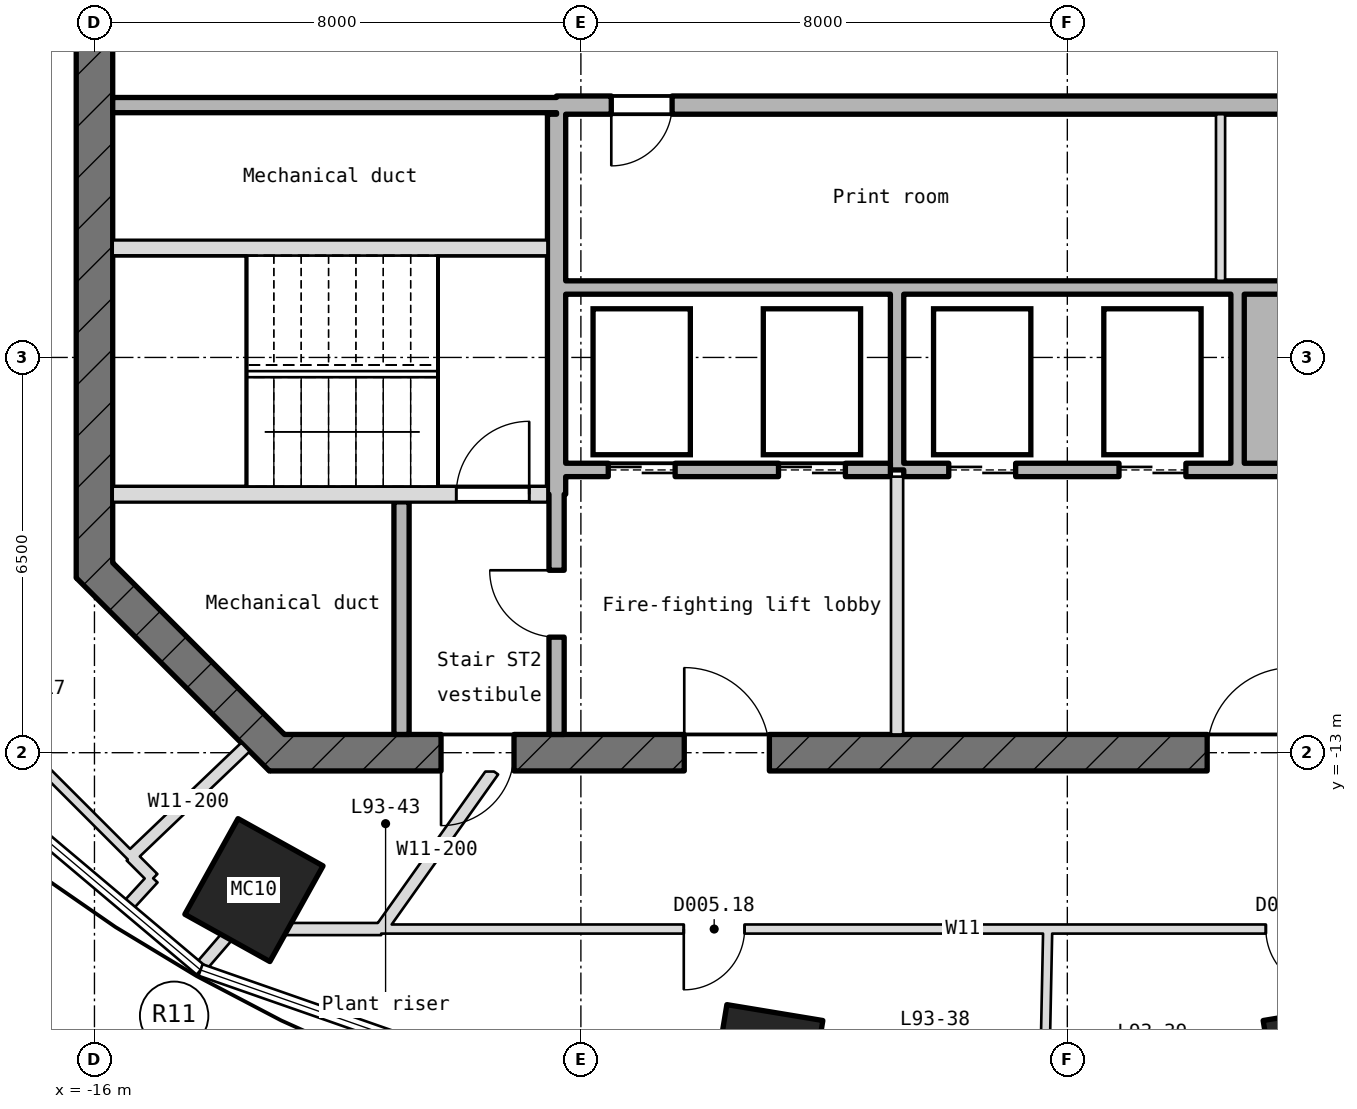
"""IFC4 building model, lengths in metres.
Left out: names, types, materials, properties, quantities, classifications, styles, units other than length and angle.
Written with IfcOpenShell. Run it as: python <this file> out.ifc"""

import sys

from ifc_helpers import new_model, si_unit, direction, frame, frame_2d, origin, origin_2d, place, context, subcontext, project, spatial, rectangle, hollow_rectangle, extrude, element, fill, save


model = new_model("IFC4")
c1 = context("Model", 3, precision=1e-05, world=origin(), true_north=direction((0.0, 1.0)))
c2 = subcontext(c1, "Body", "Model", "MODEL_VIEW")
j1 = project(units=[si_unit("LENGTHUNIT", "METRE"), si_unit("PLANEANGLEUNIT", "RADIAN")], contexts=[c1])
p1 = place(None, origin())
s1 = spatial("IfcSite", under=j1, at=p1, CompositionType="ELEMENT")
p2 = place(p1, origin())
s2 = spatial("IfcBuilding", under=s1, at=p2, CompositionType="ELEMENT")
p3 = place(p2, frame((0.0, 0.0, 413.55)))
s3 = spatial("IfcBuildingStorey", under=s2, at=p3, CompositionType="ELEMENT", Elevation=413.55)
for number, where, z_axis, x_axis in (
    (1, (-13.377, -15.26, -0.2), (0.0, 0.0, 1.0), (-0.874, 0.486, 0.0)),
    (2, (-4.957, -18.162, -0.2), (0.0, 0.0, 1.0), (-0.987, 0.163, 0.0)),
    (3, (4.157, -18.162, -0.2), (0.0, 0.0, 1.0), (-0.987, -0.163, 0.0)),
):
    element("IfcColumn", number, at=place(p3, frame(where, z_axis=z_axis, x_axis=x_axis)), inside=s3, PredefinedType="COLUMN", context=c2, shape_type="SweptSolid", body=[
        extrude(hollow_rectangle(XDim=1.6, YDim=1.8, WallThickness=0.045, at=origin_2d()), origin(), (0.0, 0.0, 1.0), 5.0),
    ])
p4 = place(p3, frame((-16.0, 10.124, -0.2), z_axis=(0.0, 0.0, 1.0), x_axis=(0.0, -1.0, 0.0)))
e4 = element("IfcWall", 4, at=p4, inside=s3, PredefinedType="SHEAR", context=c2, shape_type="SweptSolid", body=[
    extrude(rectangle(XDim=20.249, YDim=0.6, at=frame_2d((10.124, 0.0))), origin(), (0.0, 0.0, 1.0), 5.0),
])
p5 = place(p4, frame((8.924, 0.0, 0.2)))
e5 = element("IfcOpeningElement", 5, at=p5, cuts=e4, PredefinedType="OPENING", context=c2, shape_type="SweptSolid", body=[
    extrude(rectangle(XDim=2.4, YDim=2.1, at=frame_2d((1.2, 1.05))), frame((0.0, 0.31, 0.0), z_axis=(0.0, -1.0, 0.0), x_axis=(1.0, 0.0, 0.0)), (0.0, 0.0, 1.0), 0.62),
])
p6 = place(p4, frame((5.524, 0.0, 0.2)))
e6 = element("IfcOpeningElement", 6, at=p6, cuts=e4, PredefinedType="OPENING", context=c2, shape_type="SweptSolid", body=[
    extrude(rectangle(XDim=1.2, YDim=2.1, at=frame_2d((0.6, 1.05))), frame((0.0, 0.31, 0.0), z_axis=(0.0, -1.0, 0.0), x_axis=(1.0, 0.0, 0.0)), (0.0, 0.0, 1.0), 0.62),
])
p7 = place(p3, frame((-16.088, -9.912, -0.2), z_axis=(0.0, 0.0, 1.0), x_axis=(0.707106781187, -0.707106781187, 0.0)))
e7 = element("IfcWall", 7, at=p7, inside=s3, PredefinedType="SHEAR", context=c2, shape_type="SweptSolid", body=[
    extrude(rectangle(XDim=4.491, YDim=0.6, at=frame_2d((2.246, 0.0))), origin(), (0.0, 0.0, 1.0), 5.0),
])
p8 = place(p3, frame((-13.124, -13.0, -0.2), z_axis=(0.0, 0.0, 1.0), x_axis=(1.0, 0.0, 0.0)))
e8 = element("IfcWall", 8, at=p8, inside=s3, PredefinedType="SHEAR", context=c2, shape_type="SweptSolid", body=[
    extrude(rectangle(XDim=26.249, YDim=0.6, at=frame_2d((13.124, 0.0))), origin(), (0.0, 0.0, 1.0), 5.0),
])
p9 = place(p8, frame((2.824, 0.0, 0.2)))
e9 = element("IfcOpeningElement", 9, at=p9, cuts=e8, PredefinedType="OPENING", context=c2, shape_type="SweptSolid", body=[
    extrude(rectangle(XDim=1.2, YDim=2.1, at=frame_2d((0.6, 1.05))), frame((0.0, 0.31, 0.0), z_axis=(0.0, -1.0, 0.0), x_axis=(1.0, 0.0, 0.0)), (0.0, 0.0, 1.0), 0.62),
])
p10 = place(p8, frame((6.824, 0.0, 0.2)))
e10 = element("IfcOpeningElement", 10, at=p10, cuts=e8, PredefinedType="OPENING", context=c2, shape_type="SweptSolid", body=[
    extrude(rectangle(XDim=1.4, YDim=2.1, at=frame_2d((0.7, 1.05))), frame((0.0, 0.31, 0.0), z_axis=(0.0, -1.0, 0.0), x_axis=(1.0, 0.0, 0.0)), (0.0, 0.0, 1.0), 0.62),
])
p11 = place(p8, frame((15.424, 0.0, 0.2)))
e11 = element("IfcOpeningElement", 11, at=p11, cuts=e8, PredefinedType="OPENING", context=c2, shape_type="SweptSolid", body=[
    extrude(rectangle(XDim=1.4, YDim=2.1, at=frame_2d((0.7, 1.05))), frame((0.0, 0.31, 0.0), z_axis=(0.0, -1.0, 0.0), x_axis=(1.0, 0.0, 0.0)), (0.0, 0.0, 1.0), 0.62),
])
p12 = place(p3, frame((-15.7, -8.75, -0.2), z_axis=(0.0, 0.0, 1.0), x_axis=(1.0, 0.0, 0.0)))
e12 = element("IfcWall", 12, at=p12, inside=s3, PredefinedType="SHEAR", context=c2, shape_type="SweptSolid", body=[
    extrude(rectangle(XDim=7.15, YDim=0.25, at=frame_2d((3.575, 0.0))), origin(), (0.0, 0.0, 1.0), 5.0),
])
p13 = place(p12, frame((5.65, 0.0, 0.2)))
e13 = element("IfcOpeningElement", 13, at=p13, cuts=e12, PredefinedType="OPENING", context=c2, shape_type="SweptSolid", body=[
    extrude(rectangle(XDim=1.2, YDim=2.1, at=frame_2d((0.6, 1.05))), frame((0.0, 0.135, 0.0), z_axis=(0.0, -1.0, 0.0), x_axis=(1.0, 0.0, 0.0)), (0.0, 0.0, 1.0), 0.27),
])
p14 = place(p3, frame((-8.25, -8.35, 0.0), z_axis=(0.0, 0.0, 1.0), x_axis=(1.0, 0.0, 0.0)))
e14 = element("IfcWall", 14, at=p14, inside=s3, PredefinedType="STANDARD", context=c2, shape_type="SweptSolid", body=[
    extrude(rectangle(XDim=5.34, YDim=0.22, at=frame_2d((2.67, 0.0))), origin(), (0.0, 0.0, 1.0), 4.8),
])
p15 = place(p14, frame((0.7, 0.0, 0.0)))
e15 = element("IfcOpeningElement", 15, at=p15, cuts=e14, PredefinedType="OPENING", context=c2, shape_type="SweptSolid", body=[
    extrude(rectangle(XDim=1.1, YDim=2.1, at=frame_2d((0.55, 1.05))), frame((0.0, 0.12, 0.0), z_axis=(0.0, -1.0, 0.0), x_axis=(1.0, 0.0, 0.0)), (0.0, 0.0, 1.0), 0.24),
])
p16 = place(p14, frame((3.5, 0.0, 0.0)))
e16 = element("IfcOpeningElement", 16, at=p16, cuts=e14, PredefinedType="OPENING", context=c2, shape_type="SweptSolid", body=[
    extrude(rectangle(XDim=1.1, YDim=2.1, at=frame_2d((0.55, 1.05))), frame((0.0, 0.12, 0.0), z_axis=(0.0, -1.0, 0.0), x_axis=(1.0, 0.0, 0.0)), (0.0, 0.0, 1.0), 0.24),
])
p17 = place(p3, frame((-2.69, -8.35, 0.0), z_axis=(0.0, 0.0, 1.0), x_axis=(1.0, 0.0, 0.0)))
e17 = element("IfcWall", 17, at=p17, inside=s3, PredefinedType="STANDARD", context=c2, shape_type="SweptSolid", body=[
    extrude(rectangle(XDim=10.94, YDim=0.22, at=frame_2d((5.47, 0.0))), origin(), (0.0, 0.0, 1.0), 4.8),
])
p18 = place(p17, frame((0.74, 0.0, 0.0)))
e18 = element("IfcOpeningElement", 18, at=p18, cuts=e17, PredefinedType="OPENING", context=c2, shape_type="SweptSolid", body=[
    extrude(rectangle(XDim=1.1, YDim=2.1, at=frame_2d((0.55, 1.05))), frame((0.0, 0.12, 0.0), z_axis=(0.0, -1.0, 0.0), x_axis=(1.0, 0.0, 0.0)), (0.0, 0.0, 1.0), 0.24),
])
p19 = place(p17, frame((3.54, 0.0, 0.0)))
e19 = element("IfcOpeningElement", 19, at=p19, cuts=e17, PredefinedType="OPENING", context=c2, shape_type="SweptSolid", body=[
    extrude(rectangle(XDim=1.1, YDim=2.1, at=frame_2d((0.55, 1.05))), frame((0.0, 0.12, 0.0), z_axis=(0.0, -1.0, 0.0), x_axis=(1.0, 0.0, 0.0)), (0.0, 0.0, 1.0), 0.24),
])
p20 = place(p3, frame((-8.25, -5.35, 0.0), z_axis=(0.0, 0.0, 1.0), x_axis=(1.0, 0.0, 0.0)))
e20 = element("IfcWall", 20, at=p20, inside=s3, PredefinedType="STANDARD", context=c2, shape_type="SweptSolid", body=[
    extrude(rectangle(XDim=16.5, YDim=0.22, at=frame_2d((8.25, 0.0))), origin(), (0.0, 0.0, 1.0), 4.8),
])
p21 = place(p3, frame((-15.7, -4.7, -0.2), z_axis=(0.0, 0.0, 1.0), x_axis=(1.0, 0.0, 0.0)))
e21 = element("IfcWall", 21, at=p21, inside=s3, PredefinedType="SHEAR", context=c2, shape_type="SweptSolid", body=[
    extrude(rectangle(XDim=7.15, YDim=0.25, at=frame_2d((3.575, 0.0))), origin(), (0.0, 0.0, 1.0), 5.0),
])
p22 = place(p3, frame((-15.7, -2.35, 0.0), z_axis=(0.0, 0.0, 1.0), x_axis=(1.0, 0.0, 0.0)))
e22 = element("IfcWall", 22, at=p22, inside=s3, PredefinedType="STANDARD", context=c2, shape_type="SweptSolid", body=[
    extrude(rectangle(XDim=7.3, YDim=0.25, at=frame_2d((3.65, 0.0))), origin(), (0.0, 0.0, 1.0), 4.8),
])
p23 = place(p3, frame((-8.4, -2.35, -0.2), z_axis=(0.0, 0.0, 1.0), x_axis=(1.0, 0.0, 0.0)))
e23 = element("IfcWall", 23, at=p23, inside=s3, PredefinedType="SHEAR", context=c2, shape_type="SweptSolid", body=[
    extrude(rectangle(XDim=16.8, YDim=0.3, at=frame_2d((8.4, 0.0))), origin(), (0.0, 0.0, 1.0), 5.0),
])
p24 = place(p23, frame((0.9, 0.0, 0.2)))
e24 = element("IfcOpeningElement", 24, at=p24, cuts=e23, PredefinedType="OPENING", context=c2, shape_type="SweptSolid", body=[
    extrude(rectangle(XDim=1.0, YDim=2.1, at=frame_2d((0.5, 1.05))), frame((0.0, 0.16, 0.0), z_axis=(0.0, -1.0, 0.0), x_axis=(1.0, 0.0, 0.0)), (0.0, 0.0, 1.0), 0.32),
])
p25 = place(p23, frame((14.9, 0.0, 0.2)))
e25 = element("IfcOpeningElement", 25, at=p25, cuts=e23, PredefinedType="OPENING", context=c2, shape_type="SweptSolid", body=[
    extrude(rectangle(XDim=1.0, YDim=2.1, at=frame_2d((0.5, 1.05))), frame((0.0, 0.16, 0.0), z_axis=(0.0, -1.0, 0.0), x_axis=(1.0, 0.0, 0.0)), (0.0, 0.0, 1.0), 0.32),
])
p26 = place(p3, frame((-10.95, -12.7, 0.0), z_axis=(0.0, 0.0, 1.0), x_axis=(0.0, 1.0, 0.0)))
e26 = element("IfcWall", 26, at=p26, inside=s3, PredefinedType="STANDARD", context=c2, shape_type="SweptSolid", body=[
    extrude(rectangle(XDim=3.825, YDim=0.25, at=frame_2d((1.913, 0.0))), origin(), (0.0, 0.0, 1.0), 4.8),
])
p27 = place(p3, frame((-8.4, -12.7, 0.0), z_axis=(0.0, 0.0, 1.0), x_axis=(0.0, 1.0, 0.0)))
e27 = element("IfcWall", 27, at=p27, inside=s3, PredefinedType="STANDARD", context=c2, shape_type="SweptSolid", body=[
    extrude(rectangle(XDim=3.95, YDim=0.25, at=frame_2d((1.975, 0.0))), origin(), (0.0, 0.0, 1.0), 4.8),
])
p28 = place(p27, frame((1.6, 0.0, 0.0)))
e28 = element("IfcOpeningElement", 28, at=p28, cuts=e27, PredefinedType="OPENING", context=c2, shape_type="SweptSolid", body=[
    extrude(rectangle(XDim=1.1, YDim=2.1, at=frame_2d((0.55, 1.05))), frame((0.0, 0.135, 0.0), z_axis=(0.0, -1.0, 0.0), x_axis=(1.0, 0.0, 0.0)), (0.0, 0.0, 1.0), 0.27),
])
p29 = place(p3, frame((-8.4, -8.75, -0.2), z_axis=(0.0, 0.0, 1.0), x_axis=(0.0, 1.0, 0.0)))
e29 = element("IfcWall", 29, at=p29, inside=s3, PredefinedType="SHEAR", context=c2, shape_type="SweptSolid", body=[
    extrude(rectangle(XDim=6.25, YDim=0.3, at=frame_2d((3.125, 0.0))), origin(), (0.0, 0.0, 1.0), 5.0),
])
p30 = place(p3, frame((-2.8, -12.7, 0.0), z_axis=(0.0, 0.0, 1.0), x_axis=(0.0, 1.0, 0.0)))
e30 = element("IfcWall", 30, at=p30, inside=s3, PredefinedType="PARTITIONING", context=c2, shape_type="SweptSolid", body=[
    extrude(rectangle(XDim=4.24, YDim=0.2, at=frame_2d((2.12, 0.0))), origin(), (0.0, 0.0, 1.0), 4.8),
])
p31 = place(p3, frame((-2.8, -8.35, 0.0), z_axis=(0.0, 0.0, 1.0), x_axis=(0.0, 1.0, 0.0)))
e31 = element("IfcWall", 31, at=p31, inside=s3, PredefinedType="STANDARD", context=c2, shape_type="SweptSolid", body=[
    extrude(rectangle(XDim=2.89, YDim=0.22, at=frame_2d((1.445, 0.0))), origin(), (0.0, 0.0, 1.0), 4.8),
])
p32 = place(p3, frame((2.52, -5.24, 0.0), z_axis=(0.0, 0.0, 1.0), x_axis=(0.0, 1.0, 0.0)))
e32 = element("IfcWall", 32, at=p32, inside=s3, PredefinedType="PARTITIONING", context=c2, shape_type="SweptSolid", body=[
    extrude(rectangle(XDim=2.74, YDim=0.15, at=frame_2d((1.37, 0.0))), origin(), (0.0, 0.0, 1.0), 4.8),
])
p33 = place(p3, frame((2.8, -8.24, 0.0), z_axis=(0.0, 0.0, 1.0), x_axis=(0.0, 1.0, 0.0)))
e33 = element("IfcWall", 33, at=p33, inside=s3, PredefinedType="STANDARD", context=c2, shape_type="SweptSolid", body=[
    extrude(rectangle(XDim=2.78, YDim=0.22, at=frame_2d((1.39, 0.0))), origin(), (0.0, 0.0, 1.0), 4.8),
])
p34 = place(p3, frame((-11.288, -15.9, 0.0), z_axis=(0.0, 0.0, 1.0), x_axis=(1.0, 0.0, 0.0)))
e34 = element("IfcWall", 34, at=p34, inside=s3, PredefinedType="PARTITIONING", context=c2, shape_type="SweptSolid", body=[
    extrude(rectangle(XDim=19.141, YDim=0.15, at=frame_2d((9.57, 0.0))), origin(), (0.0, 0.0, 1.0), 4.8),
])
p35 = place(p34, frame((4.98, 0.0, 0.0)))
e35 = element("IfcOpeningElement", 35, at=p35, cuts=e34, PredefinedType="OPENING", context=c2, shape_type="SweptSolid", body=[
    extrude(rectangle(XDim=1.0, YDim=2.1, at=frame_2d((0.5, 1.05))), frame((0.0, 0.085, 0.0), z_axis=(0.0, -1.0, 0.0), x_axis=(1.0, 0.0, 0.0)), (0.0, 0.0, 1.0), 0.17),
])
p36 = place(p34, frame((14.553, 0.0, 0.0)))
e36 = element("IfcOpeningElement", 36, at=p36, cuts=e34, PredefinedType="OPENING", context=c2, shape_type="SweptSolid", body=[
    extrude(rectangle(XDim=1.0, YDim=2.1, at=frame_2d((0.5, 1.05))), frame((0.0, 0.085, 0.0), z_axis=(0.0, -1.0, 0.0), x_axis=(1.0, 0.0, 0.0)), (0.0, 0.0, 1.0), 0.17),
])
p37 = place(p3, frame((-0.359, -17.698, 0.0), z_axis=(0.0, 0.0, 1.0), x_axis=(0.020232174519, 0.999795308608, 0.0)))
e37 = element("IfcWall", 37, at=p37, inside=s3, PredefinedType="PARTITIONING", context=c2, shape_type="SweptSolid", body=[
    extrude(rectangle(XDim=1.798, YDim=0.15, at=frame_2d((0.899, 0.0))), origin(), (0.0, 0.0, 1.0), 4.49),
])
p38 = place(p3, frame((-15.397, -14.704, 0.0), z_axis=(0.0, 0.0, 1.0), x_axis=(-0.707082138597, 0.707131422917, 0.0)))
e38 = element("IfcWall", 38, at=p38, inside=s3, PredefinedType="PARTITIONING", context=c2, shape_type="SweptSolid", body=[
    extrude(rectangle(XDim=4.954, YDim=0.15, at=frame_2d((2.477, 0.0))), origin(), (0.0, 0.0, 1.0), 4.8),
])
p39 = place(p38, frame((1.974, 0.0, 0.0)))
e39 = element("IfcOpeningElement", 39, at=p39, cuts=e38, PredefinedType="OPENING", context=c2, shape_type="SweptSolid", body=[
    extrude(rectangle(XDim=1.0, YDim=2.1, at=frame_2d((0.5, 1.05))), frame((0.0, 0.085, 0.0), z_axis=(0.0, -1.0, 0.0), x_axis=(1.0, 0.0, 0.0)), (0.0, 0.0, 1.0), 0.17),
])
p40 = place(p3, frame((-13.714, -15.9, 0.0), z_axis=(0.0, 0.0, 1.0), x_axis=(1.0, 0.0, 0.0)))
e40 = element("IfcWall", 40, at=p40, inside=s3, PredefinedType="PARTITIONING", context=c2, shape_type="SweptSolid", body=[
    extrude(rectangle(XDim=2.429, YDim=0.2, at=frame_2d((1.215, 0.0))), origin(), (0.0, 0.0, 1.0), 4.8),
])
p41 = place(p3, frame((-15.397, -14.704, 0.0), z_axis=(0.0, 0.0, 1.0), x_axis=(0.723206343498, 0.690632018317, 0.0)))
e41 = element("IfcWall", 41, at=p41, inside=s3, PredefinedType="PARTITIONING", context=c2, shape_type="SweptSolid", body=[
    extrude(rectangle(XDim=2.601, YDim=0.2, at=frame_2d((1.3, 0.0))), origin(), (0.0, 0.0, 1.0), 4.8),
])
p42 = place(p3, frame((-15.462, -15.53, 0.0), z_axis=(0.0, 0.0, 1.0), x_axis=(0.676443601068, 0.736494436214, 0.0)))
e42 = element("IfcWall", 42, at=p42, inside=s3, PredefinedType="PARTITIONING", context=c2, shape_type="SweptSolid", body=[
    extrude(rectangle(XDim=0.63, YDim=0.2, at=frame_2d((0.315, 0.0))), origin(), (0.0, 0.0, 1.0), 4.8),
])
p43 = place(p3, frame((-14.265, -16.539, 0.0), z_axis=(0.0, 0.0, 1.0), x_axis=(0.653099884045, 0.757271775164, 0.0)))
e43 = element("IfcWall", 43, at=p43, inside=s3, PredefinedType="PARTITIONING", context=c2, shape_type="SweptSolid", body=[
    extrude(rectangle(XDim=0.844, YDim=0.2, at=frame_2d((0.422, 0.0))), origin(), (0.0, 0.0, 1.0), 4.8),
])
p44 = place(p3, frame((-11.288, -15.9, 0.0), z_axis=(0.0, 0.0, 1.0), x_axis=(0.578932609367, 0.815375394412, 0.0)))
e44 = element("IfcWall", 44, at=p44, inside=s3, PredefinedType="PARTITIONING", context=c2, shape_type="SweptSolid", body=[
    extrude(rectangle(XDim=3.188, YDim=0.2, at=frame_2d((1.594, 0.0))), origin(), (0.0, 0.0, 1.0), 4.8),
])
p45 = place(p3, frame((-15.035, -15.066, 0.0), z_axis=(0.0, 0.0, 1.0), x_axis=(-0.707106781187, 0.707106781187, 0.0)))
e45 = element("IfcWall", 45, at=p45, inside=s3, PredefinedType="PARTITIONING", context=c2, shape_type="SweptSolid", body=[
    extrude(rectangle(XDim=0.515, YDim=0.2, at=frame_2d((0.257, 0.0))), origin(), (0.0, 0.0, 1.0), 4.8),
])
p46 = place(p15, origin())
e46 = element("IfcDoor", 46, at=p46, inside=s3, OperationType="DOUBLE_DOOR_SLIDING", PredefinedType="DOOR", context=c2, shape_type="SweptSolid", body=[
    extrude(rectangle(XDim=1.1, YDim=2.1, at=frame_2d((0.55, 1.05))), frame((0.0, 0.025, 0.0), z_axis=(0.0, -1.0, 0.0), x_axis=(1.0, 0.0, 0.0)), (0.0, 0.0, 1.0), 0.05),
])
fill(e15, e46)
p47 = place(p16, origin())
e47 = element("IfcDoor", 47, at=p47, inside=s3, OperationType="DOUBLE_DOOR_SLIDING", PredefinedType="DOOR", context=c2, shape_type="SweptSolid", body=[
    extrude(rectangle(XDim=1.1, YDim=2.1, at=frame_2d((0.55, 1.05))), frame((0.0, 0.025, 0.0), z_axis=(0.0, -1.0, 0.0), x_axis=(1.0, 0.0, 0.0)), (0.0, 0.0, 1.0), 0.05),
])
fill(e16, e47)
p48 = place(p18, origin())
e48 = element("IfcDoor", 48, at=p48, inside=s3, OperationType="DOUBLE_DOOR_SLIDING", PredefinedType="DOOR", context=c2, shape_type="SweptSolid", body=[
    extrude(rectangle(XDim=1.1, YDim=2.1, at=frame_2d((0.55, 1.05))), frame((0.0, 0.025, 0.0), z_axis=(0.0, -1.0, 0.0), x_axis=(1.0, 0.0, 0.0)), (0.0, 0.0, 1.0), 0.05),
])
fill(e18, e48)
p49 = place(p19, origin())
e49 = element("IfcDoor", 49, at=p49, inside=s3, OperationType="DOUBLE_DOOR_SLIDING", PredefinedType="DOOR", context=c2, shape_type="SweptSolid", body=[
    extrude(rectangle(XDim=1.1, YDim=2.1, at=frame_2d((0.55, 1.05))), frame((0.0, 0.025, 0.0), z_axis=(0.0, -1.0, 0.0), x_axis=(1.0, 0.0, 0.0)), (0.0, 0.0, 1.0), 0.05),
])
fill(e19, e49)
p50 = place(p13, origin())
e50 = element("IfcDoor", 50, at=p50, inside=s3, OperationType="SINGLE_SWING_RIGHT", PredefinedType="DOOR", context=c2, shape_type="SweptSolid", body=[
    extrude(rectangle(XDim=1.2, YDim=2.1, at=frame_2d((0.6, 1.05))), frame((0.0, 0.025, 0.0), z_axis=(0.0, -1.0, 0.0), x_axis=(1.0, 0.0, 0.0)), (0.0, 0.0, 1.0), 0.05),
])
fill(e13, e50)
p51 = place(p28, origin())
e51 = element("IfcDoor", 51, at=p51, inside=s3, OperationType="SINGLE_SWING_RIGHT", PredefinedType="DOOR", context=c2, shape_type="SweptSolid", body=[
    extrude(rectangle(XDim=1.1, YDim=2.1, at=frame_2d((0.55, 1.05))), frame((0.0, 0.025, 0.0), z_axis=(0.0, -1.0, 0.0), x_axis=(1.0, 0.0, 0.0)), (0.0, 0.0, 1.0), 0.05),
])
fill(e28, e51)
p52 = place(p9, frame((1.2, 0.0, 0.0), z_axis=(0.0, 0.0, 1.0), x_axis=(-1.0, 0.0, 0.0)))
e52 = element("IfcDoor", 52, at=p52, inside=s3, OperationType="SINGLE_SWING_LEFT", PredefinedType="DOOR", context=c2, shape_type="SweptSolid", body=[
    extrude(rectangle(XDim=1.2, YDim=2.1, at=frame_2d((0.6, 1.05))), frame((0.0, 0.025, 0.0), z_axis=(0.0, -1.0, 0.0), x_axis=(1.0, 0.0, 0.0)), (0.0, 0.0, 1.0), 0.05),
])
fill(e9, e52)
p53 = place(p10, origin())
e53 = element("IfcDoor", 53, at=p53, inside=s3, OperationType="SINGLE_SWING_RIGHT", PredefinedType="DOOR", context=c2, shape_type="SweptSolid", body=[
    extrude(rectangle(XDim=1.4, YDim=2.1, at=frame_2d((0.7, 1.05))), frame((0.0, 0.025, 0.0), z_axis=(0.0, -1.0, 0.0), x_axis=(1.0, 0.0, 0.0)), (0.0, 0.0, 1.0), 0.05),
])
fill(e10, e53)
p54 = place(p11, origin())
e54 = element("IfcDoor", 54, at=p54, inside=s3, OperationType="SINGLE_SWING_RIGHT", PredefinedType="DOOR", context=c2, shape_type="SweptSolid", body=[
    extrude(rectangle(XDim=1.4, YDim=2.1, at=frame_2d((0.7, 1.05))), frame((0.0, 0.025, 0.0), z_axis=(0.0, -1.0, 0.0), x_axis=(1.0, 0.0, 0.0)), (0.0, 0.0, 1.0), 0.05),
])
fill(e11, e54)
p55 = place(p24, frame((1.0, 0.0, 0.0), z_axis=(0.0, 0.0, 1.0), x_axis=(-1.0, 0.0, 0.0)))
e55 = element("IfcDoor", 55, at=p55, inside=s3, OperationType="SINGLE_SWING_LEFT", PredefinedType="DOOR", context=c2, shape_type="SweptSolid", body=[
    extrude(rectangle(XDim=1.0, YDim=2.1, at=frame_2d((0.5, 1.05))), frame((0.0, 0.025, 0.0), z_axis=(0.0, -1.0, 0.0), x_axis=(1.0, 0.0, 0.0)), (0.0, 0.0, 1.0), 0.05),
])
fill(e24, e55)
p56 = place(p35, frame((1.0, 0.0, 0.0), z_axis=(0.0, 0.0, 1.0), x_axis=(-1.0, 0.0, 0.0)))
e56 = element("IfcDoor", 56, at=p56, inside=s3, OperationType="SINGLE_SWING_LEFT", PredefinedType="DOOR", context=c2, shape_type="SweptSolid", body=[
    extrude(rectangle(XDim=1.0, YDim=2.1, at=frame_2d((0.5, 1.05))), frame((0.0, 0.025, 0.0), z_axis=(0.0, -1.0, 0.0), x_axis=(1.0, 0.0, 0.0)), (0.0, 0.0, 1.0), 0.05),
])
fill(e35, e56)
p57 = place(p36, frame((1.0, 0.0, 0.0), z_axis=(0.0, 0.0, 1.0), x_axis=(-1.0, 0.0, 0.0)))
e57 = element("IfcDoor", 57, at=p57, inside=s3, OperationType="SINGLE_SWING_LEFT", PredefinedType="DOOR", context=c2, shape_type="SweptSolid", body=[
    extrude(rectangle(XDim=1.0, YDim=2.1, at=frame_2d((0.5, 1.05))), frame((0.0, 0.025, 0.0), z_axis=(0.0, -1.0, 0.0), x_axis=(1.0, 0.0, 0.0)), (0.0, 0.0, 1.0), 0.05),
])
fill(e36, e57)
save(model, sys.argv[1])
